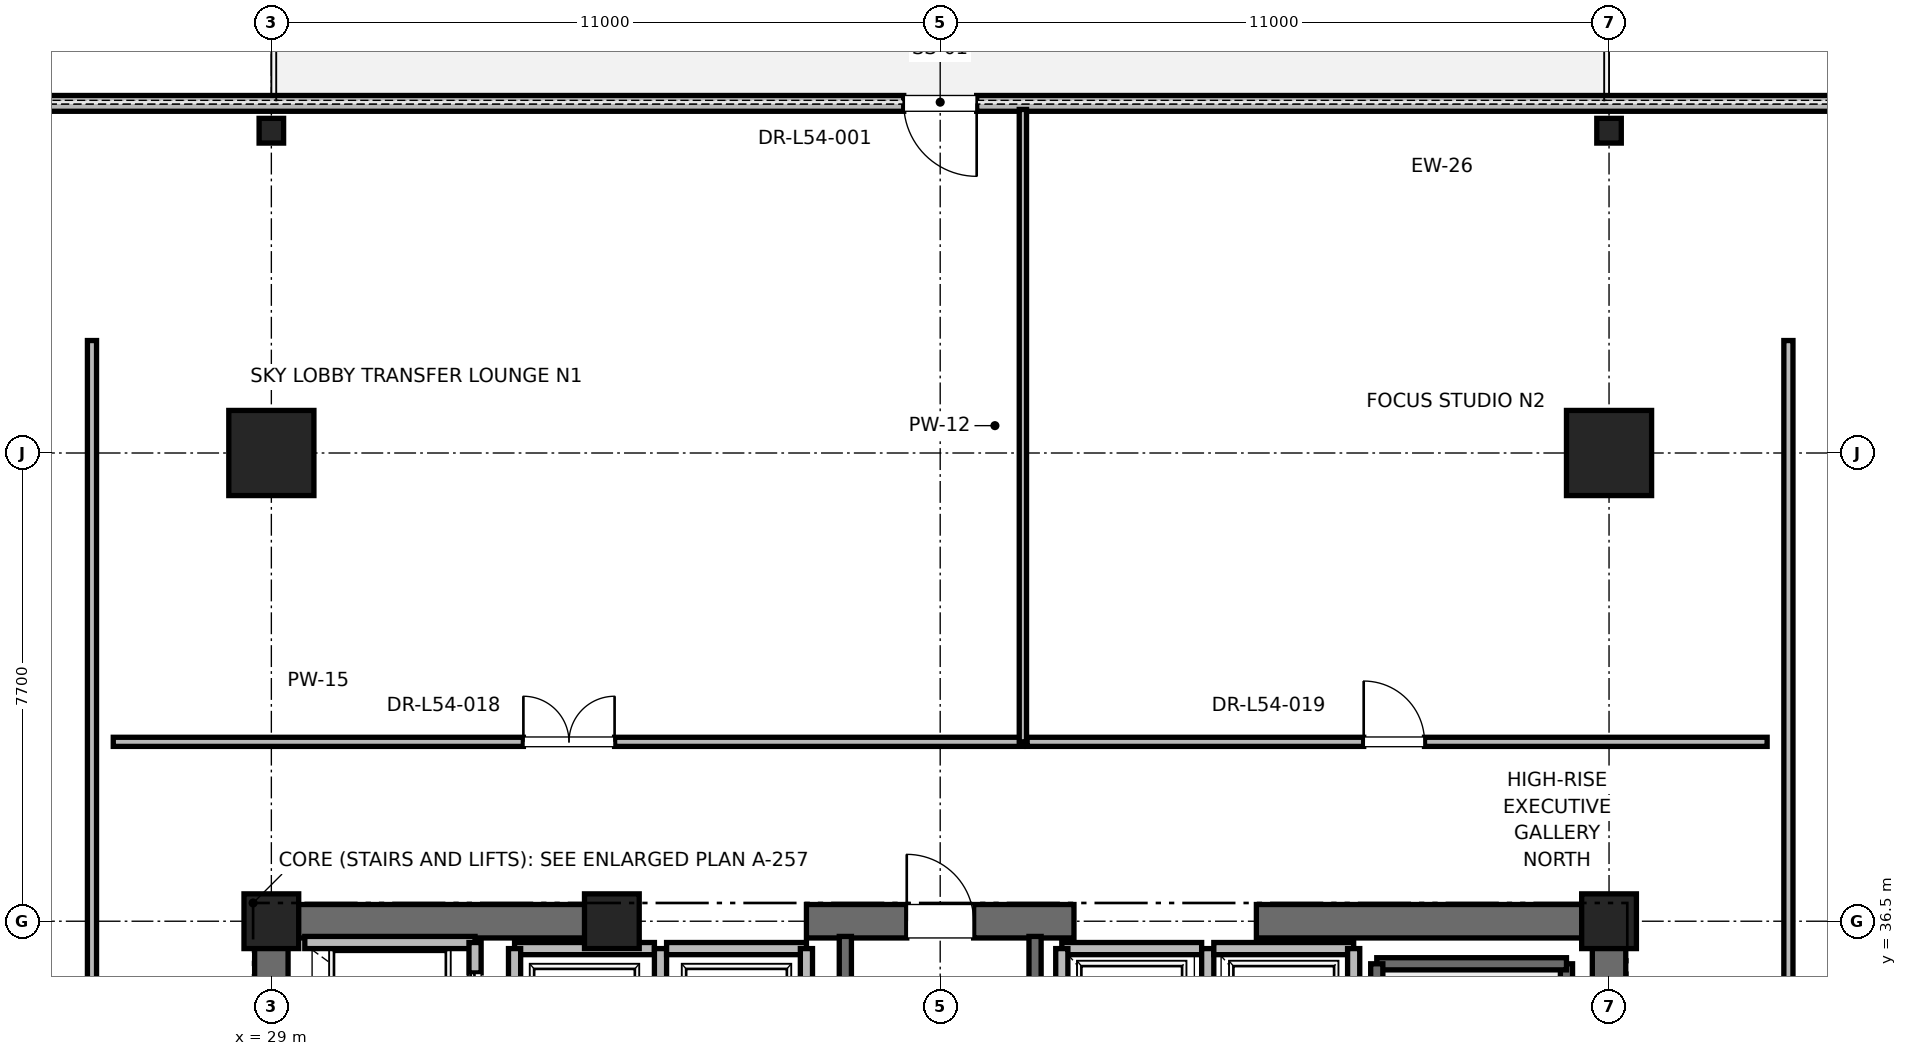
"""IFC4 building model, lengths in metres.
Left out: names, types, materials, properties, quantities, classifications, styles, units other than length and angle.
Written with IfcOpenShell. Run it as: python <this file> out.ifc"""

import sys

from ifc_helpers import new_model, si_unit, direction, frame, frame_2d, origin, origin_2d, place, context, subcontext, project, spatial, rectangle, i_section, extrude, element, fill, save


model = new_model("IFC4")
c1 = context("Model", 3, precision=1e-05, world=origin(), true_north=direction((0.0, 1.0)))
c2 = subcontext(c1, "Body", "Model", "MODEL_VIEW")
j1 = project(units=[si_unit("LENGTHUNIT", "METRE"), si_unit("PLANEANGLEUNIT", "RADIAN")], contexts=[c1])
p1 = place(None, origin())
s1 = spatial("IfcSite", under=j1, at=p1, CompositionType="ELEMENT")
p2 = place(p1, origin())
s2 = spatial("IfcBuilding", under=s1, at=p2, CompositionType="ELEMENT")
p3 = place(p2, frame((0.0, 0.0, 233.2)))
s3 = spatial("IfcBuildingStorey", under=s2, at=p3, CompositionType="ELEMENT", Elevation=233.2)
for number, where, z_axis, x_axis in (
    (1, (29.0, 44.2, 0.0), (0.0, 0.0, 1.0), (1.0, 0.0, 0.0)),
    (2, (51.0, 44.2, 0.0), (0.0, 0.0, 1.0), (1.0, 0.0, 0.0)),
):
    element("IfcColumn", number, at=place(p3, frame(where, z_axis=z_axis, x_axis=x_axis)), inside=s3, PredefinedType="COLUMN", context=c2, shape_type="SweptSolid", body=[
        extrude(rectangle(XDim=1.4, YDim=1.4, at=origin_2d()), origin(), (0.0, 0.0, 1.0), 5.0),
    ])
for number, where, z_axis, x_axis in (
    (3, (29.0, 49.5, 0.0), (0.0, 0.0, 1.0), (1.0, 0.0, 0.0)),
    (4, (51.0, 49.5, 0.0), (0.0, 0.0, 1.0), (1.0, 0.0, 0.0)),
):
    element("IfcColumn", number, at=place(p3, frame(where, z_axis=z_axis, x_axis=x_axis)), inside=s3, PredefinedType="COLUMN", context=c2, shape_type="SweptSolid", body=[
        extrude(i_section(OverallWidth=0.403, OverallDepth=0.406, WebThickness=0.027, FlangeThickness=0.043, FilletRadius=0.015, at=origin_2d()), origin(), (0.0, 0.0, 1.0), 5.0),
    ])
for number, where, z_axis, x_axis in (
    (5, (29.0, 36.5, 0.0), (0.0, 0.0, 1.0), (1.0, 0.0, 0.0)),
    (6, (51.0, 36.5, 0.0), (0.0, 0.0, 1.0), (1.0, 0.0, 0.0)),
    (7, (34.6, 36.5, 0.0), (0.0, 0.0, 1.0), (1.0, 0.0, 0.0)),
):
    element("IfcColumn", number, at=place(p3, frame(where, z_axis=z_axis, x_axis=x_axis)), inside=s3, PredefinedType="PILASTER", context=c2, shape_type="SweptSolid", body=[
        extrude(rectangle(XDim=0.9, YDim=0.9, at=origin_2d()), origin(), (0.0, 0.0, 1.0), 5.0),
    ])
p4 = place(p3, frame((29.0, 36.5, 0.0), z_axis=(0.0, 0.0, 1.0), x_axis=(1.0, 0.0, 0.0)))
e8 = element("IfcWall", 8, at=p4, inside=s3, PredefinedType="SHEAR", context=c2, shape_type="SweptSolid", body=[
    extrude(rectangle(XDim=5.8, YDim=0.55, at=frame_2d((2.9, 0.0))), origin(), (0.0, 0.0, 1.0), 4.7),
])
p5 = place(p3, frame((37.8, 36.5, 0.0), z_axis=(0.0, 0.0, 1.0), x_axis=(1.0, 0.0, 0.0)))
e9 = element("IfcWall", 9, at=p5, inside=s3, PredefinedType="SHEAR", context=c2, shape_type="SweptSolid", body=[
    extrude(rectangle(XDim=4.4, YDim=0.55, at=frame_2d((2.2, 0.0))), origin(), (0.0, 0.0, 1.0), 4.7),
])
p6 = place(p5, frame((1.65, 0.0, 0.0)))
e10 = element("IfcOpeningElement", 10, at=p6, cuts=e9, PredefinedType="OPENING", context=c2, shape_type="SweptSolid", body=[
    extrude(rectangle(XDim=1.1, YDim=2.15, at=frame_2d((0.55, 1.075))), frame((0.0, 0.275, 0.0), z_axis=(0.0, -1.0, 0.0), x_axis=(1.0, 0.0, 0.0)), (0.0, 0.0, 1.0), 0.55),
])
for number, where, z_axis, x_axis in (
    (11, (45.2, 36.5, 0.0), (0.0, 0.0, 1.0), (1.0, 0.0, 0.0)),
    (12, (29.0, 30.7, 0.0), (0.0, 0.0, 1.0), (0.0, 1.0, 0.0)),
):
    element("IfcWall", number, at=place(p3, frame(where, z_axis=z_axis, x_axis=x_axis)), inside=s3, PredefinedType="SHEAR", context=c2, shape_type="SweptSolid", body=[
        extrude(rectangle(XDim=5.8, YDim=0.55, at=frame_2d((2.9, 0.0))), origin(), (0.0, 0.0, 1.0), 4.7),
    ])
p7 = place(p3, frame((51.0, 27.7, 0.0), z_axis=(0.0, 0.0, 1.0), x_axis=(0.0, 1.0, 0.0)))
e13 = element("IfcWall", 13, at=p7, inside=s3, PredefinedType="SHEAR", context=c2, shape_type="SweptSolid", body=[
    extrude(rectangle(XDim=8.8, YDim=0.55, at=frame_2d((4.4, 0.0))), origin(), (0.0, 0.0, 1.0), 4.7),
])
p8 = place(p3, frame((62.107, 49.95, 0.0), z_axis=(0.0, 0.0, 1.0), x_axis=(-1.0, 0.0, 0.0)))
e14 = element("IfcWall", 14, at=p8, inside=s3, PredefinedType="PARAPET", context=c2, shape_type="SweptSolid", body=[
    extrude(rectangle(XDim=44.214, YDim=0.26, at=frame_2d((22.107, 0.0))), origin(), (0.0, 0.0, 1.0), 3.987),
])
p9 = place(p8, frame((4.2, 0.0, 0.85)))
e15 = element("IfcOpeningElement", 15, at=p9, cuts=e14, PredefinedType="OPENING", context=c2, shape_type="SweptSolid", body=[
    extrude(rectangle(XDim=2.0, YDim=2.3, at=frame_2d((1.0, 1.15))), frame((0.0, 0.13, 0.0), z_axis=(0.0, -1.0, 0.0), x_axis=(1.0, 0.0, 0.0)), (0.0, 0.0, 1.0), 0.26),
])
p10 = place(p8, frame((21.507, 0.0, 0.0)))
e16 = element("IfcOpeningElement", 16, at=p10, cuts=e14, PredefinedType="OPENING", context=c2, shape_type="SweptSolid", body=[
    extrude(rectangle(XDim=1.2, YDim=2.2, at=frame_2d((0.6, 1.1))), frame((0.0, 0.13, 0.0), z_axis=(0.0, -1.0, 0.0), x_axis=(1.0, 0.0, 0.0)), (0.0, 0.0, 1.0), 0.26),
])
p11 = place(p8, frame((38.014, 0.0, 0.85)))
e17 = element("IfcOpeningElement", 17, at=p11, cuts=e14, PredefinedType="OPENING", context=c2, shape_type="SweptSolid", body=[
    extrude(rectangle(XDim=2.0, YDim=2.3, at=frame_2d((1.0, 1.15))), frame((0.0, 0.13, 0.0), z_axis=(0.0, -1.0, 0.0), x_axis=(1.0, 0.0, 0.0)), (0.0, 0.0, 1.0), 0.26),
])
p12 = place(p3, frame((50.3, 27.65, 0.0), z_axis=(0.0, 0.0, 1.0), x_axis=(0.0, 1.0, 0.0)))
e18 = element("IfcWall", 18, at=p12, inside=s3, PredefinedType="SOLIDWALL", context=c2, shape_type="SweptSolid", body=[
    extrude(rectangle(XDim=8.15, YDim=0.2, at=frame_2d((4.075, 0.0))), origin(), (0.0, 0.0, 1.0), 4.7),
])
p13 = place(p3, frame((47.18, 35.8, 0.0), z_axis=(0.0, 0.0, 1.0), x_axis=(1.0, 0.0, 0.0)))
e19 = element("IfcWall", 19, at=p13, inside=s3, PredefinedType="SOLIDWALL", context=c2, shape_type="SweptSolid", body=[
    extrude(rectangle(XDim=3.12, YDim=0.2, at=frame_2d((1.56, 0.0))), origin(), (0.0, 0.0, 1.0), 4.7),
])
p14 = place(p3, frame((47.18, 27.62, 0.0), z_axis=(0.0, 0.0, 1.0), x_axis=(0.0, 1.0, 0.0)))
e20 = element("IfcWall", 20, at=p14, inside=s3, PredefinedType="SOLIDWALL", context=c2, shape_type="SweptSolid", body=[
    extrude(rectangle(XDim=8.18, YDim=0.2, at=frame_2d((4.09, 0.0))), origin(), (0.0, 0.0, 1.0), 4.7),
])
p15 = place(p3, frame((38.44, 27.38, 0.0), z_axis=(0.0, 0.0, 1.0), x_axis=(0.0, 1.0, 0.0)))
e21 = element("IfcWall", 21, at=p15, inside=s3, PredefinedType="SOLIDWALL", context=c2, shape_type="SweptSolid", body=[
    extrude(rectangle(XDim=8.87, YDim=0.2, at=frame_2d((4.435, 0.0))), origin(), (0.0, 0.0, 1.0), 4.7),
])
p16 = place(p3, frame((41.56, 27.68, 0.0), z_axis=(0.0, 0.0, 1.0), x_axis=(0.0, 1.0, 0.0)))
e22 = element("IfcWall", 22, at=p16, inside=s3, PredefinedType="SOLIDWALL", context=c2, shape_type="SweptSolid", body=[
    extrude(rectangle(XDim=8.57, YDim=0.2, at=frame_2d((4.285, 0.0))), origin(), (0.0, 0.0, 1.0), 4.7),
])
p17 = place(p3, frame((32.35, 36.15, 0.0), z_axis=(0.0, 0.0, 1.0), x_axis=(-1.0, 0.0, 0.0)))
e23 = element("IfcWall", 23, at=p17, inside=s3, PredefinedType="SOLIDWALL", context=c2, shape_type="SweptSolid", body=[
    extrude(rectangle(XDim=2.8, YDim=0.2, at=frame_2d((1.4, 0.0))), origin(), (0.0, 0.0, 1.0), 3.987),
])
p18 = place(p3, frame((32.35, 34.05, 0.0), z_axis=(0.0, 0.0, 1.0), x_axis=(0.0, 1.0, 0.0)))
e24 = element("IfcWall", 24, at=p18, inside=s3, PredefinedType="SOLIDWALL", context=c2, shape_type="SweptSolid", body=[
    extrude(rectangle(XDim=2.1, YDim=0.2, at=frame_2d((1.05, 0.0))), origin(), (0.0, 0.0, 1.0), 4.7),
])
p19 = place(p18, frame((0.5, 0.0, 0.0)))
e25 = element("IfcOpeningElement", 25, at=p19, cuts=e24, PredefinedType="OPENING", context=c2, shape_type="SweptSolid", body=[
    extrude(rectangle(XDim=1.1, YDim=2.2, at=frame_2d((0.55, 1.1))), frame((0.0, 0.1, 0.0), z_axis=(0.0, -1.0, 0.0), x_axis=(1.0, 0.0, 0.0)), (0.0, 0.0, 1.0), 0.2),
])
p20 = place(p3, frame((35.3, 36.05, 0.0), z_axis=(0.0, 0.0, 1.0), x_axis=(-1.0, 0.0, 0.0)))
e26 = element("IfcWall", 26, at=p20, inside=s3, PredefinedType="SOLIDWALL", context=c2, shape_type="SweptSolid", body=[
    extrude(rectangle(XDim=2.3, YDim=0.2, at=frame_2d((1.15, 0.0))), origin(), (0.0, 0.0, 1.0), 3.68),
])
p21 = place(p3, frame((33.0, 36.05, 0.0), z_axis=(0.0, 0.0, 1.0), x_axis=(0.0, -1.0, 0.0)))
e27 = element("IfcWall", 27, at=p21, inside=s3, PredefinedType="SOLIDWALL", context=c2, shape_type="SweptSolid", body=[
    extrude(rectangle(XDim=2.6, YDim=0.2, at=frame_2d((1.3, 0.0))), origin(), (0.0, 0.0, 1.0), 4.7),
])
p22 = place(p3, frame((35.4, 33.45, 0.0), z_axis=(0.0, 0.0, 1.0), x_axis=(0.0, 1.0, 0.0)))
e28 = element("IfcWall", 28, at=p22, inside=s3, PredefinedType="SOLIDWALL", context=c2, shape_type="SweptSolid", body=[
    extrude(rectangle(XDim=2.6, YDim=0.2, at=frame_2d((1.3, 0.0))), origin(), (0.0, 0.0, 1.0), 3.68),
])
p23 = place(p3, frame((37.8, 36.05, 0.0), z_axis=(0.0, 0.0, 1.0), x_axis=(-1.0, 0.0, 0.0)))
e29 = element("IfcWall", 29, at=p23, inside=s3, PredefinedType="SOLIDWALL", context=c2, shape_type="SweptSolid", body=[
    extrude(rectangle(XDim=2.3, YDim=0.2, at=frame_2d((1.15, 0.0))), origin(), (0.0, 0.0, 1.0), 3.68),
])
p24 = place(p3, frame((37.8, 33.45, 0.0), z_axis=(0.0, 0.0, 1.0), x_axis=(0.0, 1.0, 0.0)))
e30 = element("IfcWall", 30, at=p24, inside=s3, PredefinedType="SOLIDWALL", context=c2, shape_type="SweptSolid", body=[
    extrude(rectangle(XDim=2.6, YDim=0.2, at=frame_2d((1.3, 0.0))), origin(), (0.0, 0.0, 1.0), 3.68),
])
p25 = place(p3, frame((44.3, 36.05, 0.0), z_axis=(0.0, 0.0, 1.0), x_axis=(-1.0, 0.0, 0.0)))
e31 = element("IfcWall", 31, at=p25, inside=s3, PredefinedType="SOLIDWALL", context=c2, shape_type="SweptSolid", body=[
    extrude(rectangle(XDim=2.3, YDim=0.2, at=frame_2d((1.15, 0.0))), origin(), (0.0, 0.0, 1.0), 3.68),
])
for number, where, z_axis, x_axis in (
    (32, (42.0, 36.05, 0.0), (0.0, 0.0, 1.0), (0.0, -1.0, 0.0)),
    (33, (44.4, 33.45, 0.0), (0.0, 0.0, 1.0), (0.0, 1.0, 0.0)),
):
    element("IfcWall", number, at=place(p3, frame(where, z_axis=z_axis, x_axis=x_axis)), inside=s3, PredefinedType="SOLIDWALL", context=c2, shape_type="SweptSolid", body=[
        extrude(rectangle(XDim=2.6, YDim=0.2, at=frame_2d((1.3, 0.0))), origin(), (0.0, 0.0, 1.0), 3.68),
    ])
p26 = place(p3, frame((46.8, 36.05, 0.0), z_axis=(0.0, 0.0, 1.0), x_axis=(-1.0, 0.0, 0.0)))
e34 = element("IfcWall", 34, at=p26, inside=s3, PredefinedType="SOLIDWALL", context=c2, shape_type="SweptSolid", body=[
    extrude(rectangle(XDim=2.3, YDim=0.2, at=frame_2d((1.15, 0.0))), origin(), (0.0, 0.0, 1.0), 3.68),
])
p27 = place(p3, frame((46.8, 33.45, 0.0), z_axis=(0.0, 0.0, 1.0), x_axis=(0.0, 1.0, 0.0)))
e35 = element("IfcWall", 35, at=p27, inside=s3, PredefinedType="SOLIDWALL", context=c2, shape_type="SweptSolid", body=[
    extrude(rectangle(XDim=2.6, YDim=0.2, at=frame_2d((1.3, 0.0))), origin(), (0.0, 0.0, 1.0), 4.7),
])
p28 = place(p3, frame((26.4, 39.45, 0.0), z_axis=(0.0, 0.0, 1.0), x_axis=(1.0, 0.0, 0.0)))
e36 = element("IfcWall", 36, at=p28, inside=s3, PredefinedType="PARTITIONING", context=c2, shape_type="SweptSolid", body=[
    extrude(rectangle(XDim=14.96, YDim=0.15, at=frame_2d((7.48, 0.0))), origin(), (0.0, 0.0, 1.0), 2.85),
])
p29 = place(p28, frame((6.745, 0.0, 0.0)))
e37 = element("IfcOpeningElement", 37, at=p29, cuts=e36, PredefinedType="OPENING", context=c2, shape_type="SweptSolid", body=[
    extrude(rectangle(XDim=1.5, YDim=2.25, at=frame_2d((0.75, 1.125))), frame((0.0, 0.075, 0.0), z_axis=(0.0, -1.0, 0.0), x_axis=(1.0, 0.0, 0.0)), (0.0, 0.0, 1.0), 0.15),
])
p30 = place(p3, frame((41.36, 39.45, 0.0), z_axis=(0.0, 0.0, 1.0), x_axis=(0.0, 1.0, 0.0)))
e38 = element("IfcWall", 38, at=p30, inside=s3, PredefinedType="PARTITIONING", context=c2, shape_type="SweptSolid", body=[
    extrude(rectangle(XDim=10.4, YDim=0.12, at=frame_2d((5.2, 0.0))), origin(), (0.0, 0.0, 1.0), 2.85),
])
p31 = place(p3, frame((41.43, 39.45, 0.0), z_axis=(0.0, 0.0, 1.0), x_axis=(1.0, 0.0, 0.0)))
e39 = element("IfcWall", 39, at=p31, inside=s3, PredefinedType="PARTITIONING", context=c2, shape_type="SweptSolid", body=[
    extrude(rectangle(XDim=12.17, YDim=0.15, at=frame_2d((6.085, 0.0))), origin(), (0.0, 0.0, 1.0), 2.85),
])
p32 = place(p31, frame((5.535, 0.0, 0.0)))
e40 = element("IfcOpeningElement", 40, at=p32, cuts=e39, PredefinedType="OPENING", context=c2, shape_type="SweptSolid", body=[
    extrude(rectangle(XDim=1.0, YDim=2.15, at=frame_2d((0.5, 1.075))), frame((0.0, 0.075, 0.0), z_axis=(0.0, -1.0, 0.0), x_axis=(1.0, 0.0, 0.0)), (0.0, 0.0, 1.0), 0.15),
])
p33 = place(p3, frame((26.05, 24.602, 0.0), z_axis=(0.0, 0.0, 1.0), x_axis=(0.0, 1.0, 0.0)))
e41 = element("IfcWall", 41, at=p33, inside=s3, PredefinedType="PARTITIONING", context=c2, shape_type="SweptSolid", body=[
    extrude(rectangle(XDim=21.448, YDim=0.15, at=frame_2d((10.724, 0.0))), origin(), (0.0, 0.0, 1.0), 2.85),
])
p34 = place(p33, frame((5.399, 0.0, 0.0)))
e42 = element("IfcOpeningElement", 42, at=p34, cuts=e41, PredefinedType="OPENING", context=c2, shape_type="SweptSolid", body=[
    extrude(rectangle(XDim=1.0, YDim=2.15, at=frame_2d((0.5, 1.075))), frame((0.0, 0.075, 0.0), z_axis=(0.0, -1.0, 0.0), x_axis=(1.0, 0.0, 0.0)), (0.0, 0.0, 1.0), 0.15),
])
p35 = place(p3, frame((53.95, 30.538, 0.0), z_axis=(0.0, 0.0, 1.0), x_axis=(0.0, 1.0, 0.0)))
e43 = element("IfcWall", 43, at=p35, inside=s3, PredefinedType="PARTITIONING", context=c2, shape_type="SweptSolid", body=[
    extrude(rectangle(XDim=15.512, YDim=0.15, at=frame_2d((7.756, 0.0))), origin(), (0.0, 0.0, 1.0), 2.85),
])
p36 = place(p35, frame((2.406, 0.0, 0.0)))
e44 = element("IfcOpeningElement", 44, at=p36, cuts=e43, PredefinedType="OPENING", context=c2, shape_type="SweptSolid", body=[
    extrude(rectangle(XDim=1.05, YDim=2.2, at=frame_2d((0.525, 1.1))), frame((0.0, 0.075, 0.0), z_axis=(0.0, -1.0, 0.0), x_axis=(1.0, 0.0, 0.0)), (0.0, 0.0, 1.0), 0.15),
])
p37 = place(p10, origin())
e45 = element("IfcDoor", 45, at=p37, inside=s3, OperationType="SINGLE_SWING_LEFT", PredefinedType="DOOR", context=c2, shape_type="SweptSolid", body=[
    extrude(rectangle(XDim=1.2, YDim=2.2, at=frame_2d((0.6, 1.1))), frame((0.0, 0.025, 0.0), z_axis=(0.0, -1.0, 0.0), x_axis=(1.0, 0.0, 0.0)), (0.0, 0.0, 1.0), 0.05),
])
fill(e16, e45)
p38 = place(p6, origin())
e46 = element("IfcDoor", 46, at=p38, inside=s3, OperationType="SINGLE_SWING_LEFT", PredefinedType="DOOR", context=c2, shape_type="SweptSolid", body=[
    extrude(rectangle(XDim=1.1, YDim=2.15, at=frame_2d((0.55, 1.075))), frame((0.0, 0.025, 0.0), z_axis=(0.0, -1.0, 0.0), x_axis=(1.0, 0.0, 0.0)), (0.0, 0.0, 1.0), 0.05),
])
fill(e10, e46)
p39 = place(p19, origin())
e47 = element("IfcDoor", 47, at=p39, inside=s3, OperationType="SLIDING_TO_RIGHT", PredefinedType="DOOR", context=c2, shape_type="SweptSolid", body=[
    extrude(rectangle(XDim=1.1, YDim=2.2, at=frame_2d((0.55, 1.1))), frame((0.0, 0.025, 0.0), z_axis=(0.0, -1.0, 0.0), x_axis=(1.0, 0.0, 0.0)), (0.0, 0.0, 1.0), 0.05),
])
fill(e25, e47)
p40 = place(p29, origin())
e48 = element("IfcDoor", 48, at=p40, inside=s3, OperationType="DOUBLE_DOOR_SINGLE_SWING", PredefinedType="DOOR", context=c2, shape_type="SweptSolid", body=[
    extrude(rectangle(XDim=1.5, YDim=2.25, at=frame_2d((0.75, 1.125))), frame((0.0, 0.025, 0.0), z_axis=(0.0, -1.0, 0.0), x_axis=(1.0, 0.0, 0.0)), (0.0, 0.0, 1.0), 0.05),
])
fill(e37, e48)
p41 = place(p32, origin())
e49 = element("IfcDoor", 49, at=p41, inside=s3, OperationType="SINGLE_SWING_LEFT", PredefinedType="DOOR", context=c2, shape_type="SweptSolid", body=[
    extrude(rectangle(XDim=1.0, YDim=2.15, at=frame_2d((0.5, 1.075))), frame((0.0, 0.025, 0.0), z_axis=(0.0, -1.0, 0.0), x_axis=(1.0, 0.0, 0.0)), (0.0, 0.0, 1.0), 0.05),
])
fill(e40, e49)
save(model, sys.argv[1])
